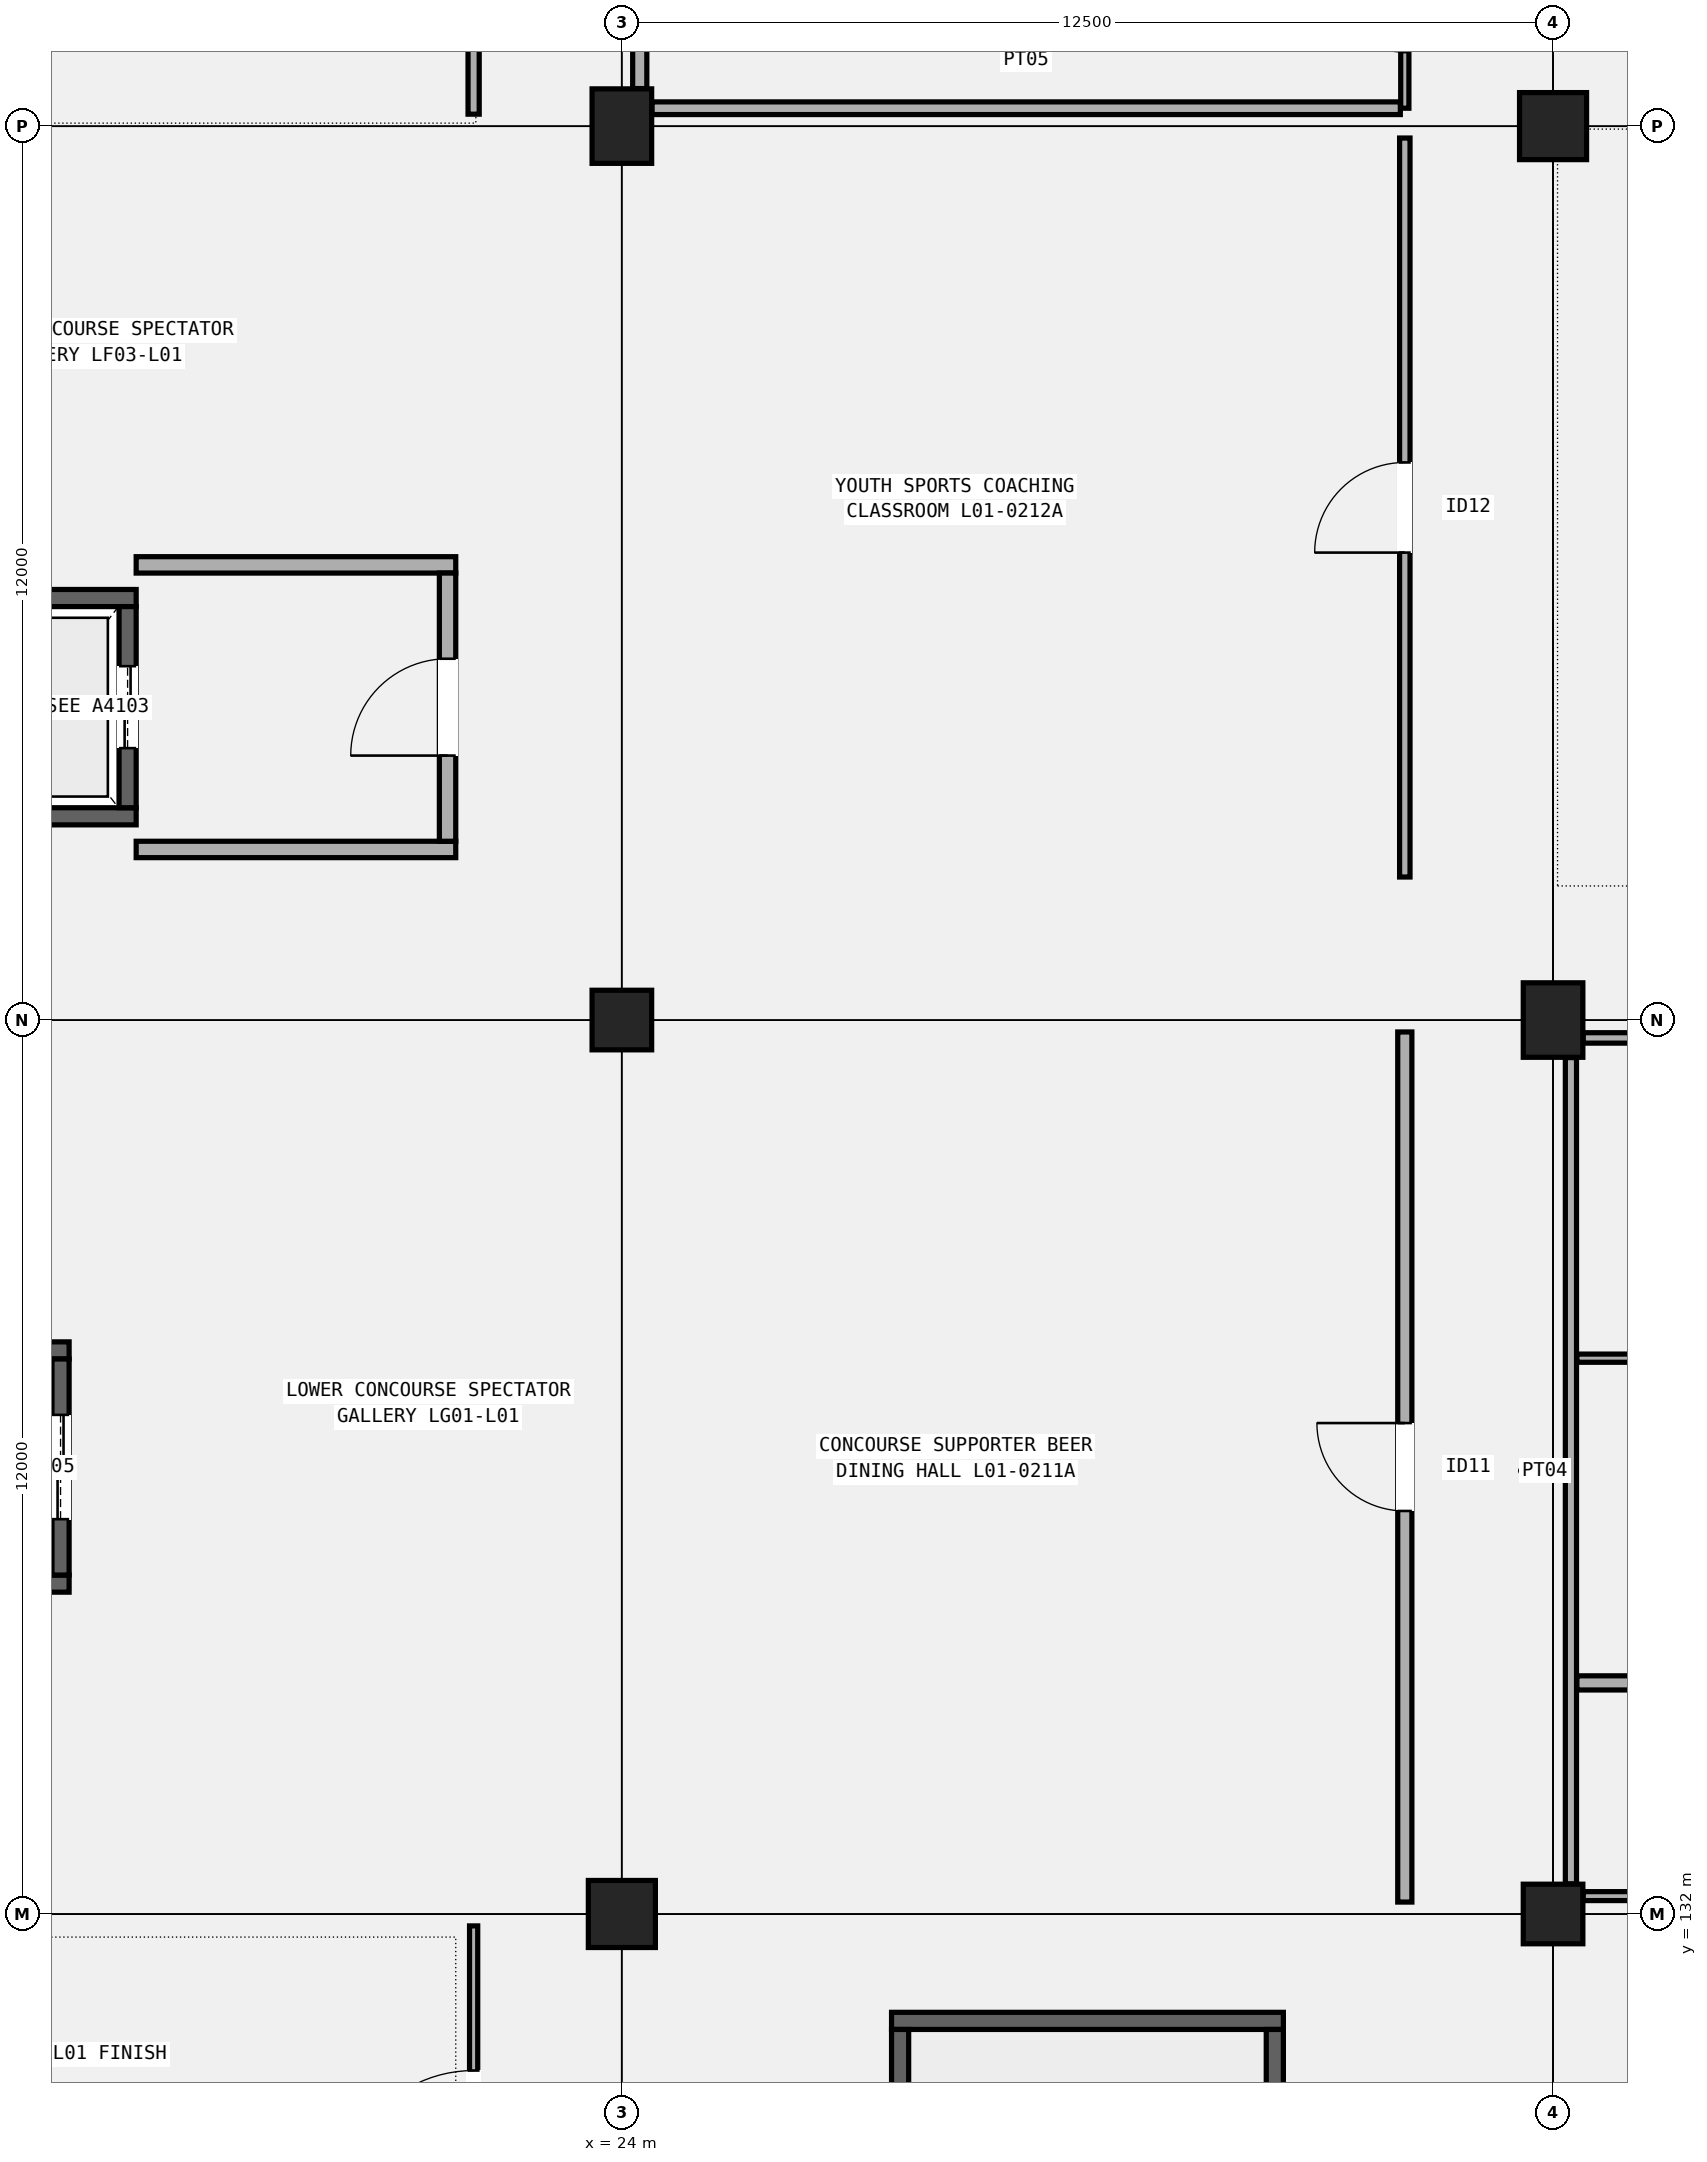
"""IFC4 building model, lengths in metres.
Left out: names, types, materials, properties, quantities, classifications, styles, units other than length and angle.
Written with IfcOpenShell. Run it as: python <this file> out.ifc"""

import sys

from ifc_helpers import new_model, si_unit, direction, frame, frame_2d, origin, origin_2d, place, context, subcontext, project, spatial, rectangle, extrude, element, fill, save


model = new_model("IFC4")
c1 = context("Model", 3, precision=1e-05, world=origin(), true_north=direction((0.0, 1.0)))
c2 = subcontext(c1, "Body", "Model", "MODEL_VIEW")
j1 = project(units=[si_unit("LENGTHUNIT", "METRE"), si_unit("PLANEANGLEUNIT", "RADIAN")], contexts=[c1])
p1 = place(None, origin())
s1 = spatial("IfcSite", under=j1, at=p1, CompositionType="ELEMENT")
p2 = place(p1, origin())
s2 = spatial("IfcBuilding", under=s1, at=p2, CompositionType="ELEMENT")
p3 = place(p2, frame((0.0, 0.0, 5.4)))
s3 = spatial("IfcBuildingStorey", under=s2, at=p3, CompositionType="ELEMENT", Elevation=5.4)
p4 = place(p3, frame((24.0, 132.0, 0.0), z_axis=(0.0, 0.0, 1.0), x_axis=(1.0, 0.0, 0.0)))
e1 = element("IfcColumn", 1, at=p4, inside=s3, PredefinedType="COLUMN", context=c2, shape_type="SweptSolid", body=[
    extrude(rectangle(XDim=0.9, YDim=0.9, at=origin_2d()), origin(), (0.0, 0.0, 1.0), 4.8),
])
p5 = place(p3, frame((24.0, 144.0, 0.0), z_axis=(0.0, 0.0, 1.0), x_axis=(1.0, 0.0, 0.0)))
e2 = element("IfcColumn", 2, at=p5, inside=s3, PredefinedType="COLUMN", context=c2, shape_type="SweptSolid", body=[
    extrude(rectangle(XDim=0.8, YDim=0.8, at=origin_2d()), origin(), (0.0, 0.0, 1.0), 4.8),
])
p6 = place(p3, frame((24.0, 156.0, 0.0), z_axis=(0.0, 0.0, 1.0), x_axis=(1.0, 0.0, 0.0)))
e3 = element("IfcColumn", 3, at=p6, inside=s3, PredefinedType="COLUMN", context=c2, shape_type="SweptSolid", body=[
    extrude(rectangle(XDim=0.8, YDim=1.0, at=origin_2d()), origin(), (0.0, 0.0, 1.0), 4.8),
])
p7 = place(p3, frame((36.5, 132.0, 0.0), z_axis=(0.0, 0.0, 1.0), x_axis=(1.0, 0.0, 0.0)))
e4 = element("IfcColumn", 4, at=p7, inside=s3, PredefinedType="COLUMN", context=c2, shape_type="SweptSolid", body=[
    extrude(rectangle(XDim=0.8, YDim=0.8, at=origin_2d()), origin(), (0.0, 0.0, 1.0), 4.8),
])
p8 = place(p3, frame((36.5, 144.0, 0.0), z_axis=(0.0, 0.0, 1.0), x_axis=(1.0, 0.0, 0.0)))
e5 = element("IfcColumn", 5, at=p8, inside=s3, PredefinedType="COLUMN", context=c2, shape_type="SweptSolid", body=[
    extrude(rectangle(XDim=0.8, YDim=1.0, at=origin_2d()), origin(), (0.0, 0.0, 1.0), 4.8),
])
p9 = place(p3, frame((36.5, 156.0, 0.0), z_axis=(0.0, 0.0, 1.0), x_axis=(1.0, 0.0, 0.0)))
e6 = element("IfcColumn", 6, at=p9, inside=s3, PredefinedType="COLUMN", context=c2, shape_type="SweptSolid", body=[
    extrude(rectangle(XDim=0.9, YDim=0.9, at=origin_2d()), origin(), (0.0, 0.0, 1.0), 4.8),
])
p10 = place(p3, frame((27.62, 130.565, 0.0), z_axis=(0.0, 0.0, 1.0), x_axis=(1.0, 0.0, 0.0)))
e7 = element("IfcWall", 7, at=p10, inside=s3, PredefinedType="SHEAR", context=c2, shape_type="SweptSolid", body=[
    extrude(rectangle(XDim=5.26, YDim=0.23, at=frame_2d((2.63, 0.0))), origin(), (0.0, 0.0, 1.0), 4.55),
])
for number, where, z_axis, x_axis in (
    (8, (27.735, 121.55, 0.0), (0.0, 0.0, 1.0), (0.0, 1.0, 0.0)),
    (9, (32.765, 121.55, 0.0), (0.0, 0.0, 1.0), (0.0, 1.0, 0.0)),
):
    element("IfcWall", number, at=place(p3, frame(where, z_axis=z_axis, x_axis=x_axis)), inside=s3, PredefinedType="SHEAR", context=c2, shape_type="SweptSolid", body=[
        extrude(rectangle(XDim=8.9, YDim=0.23, at=frame_2d((4.45, 0.0))), origin(), (0.0, 0.0, 1.0), 4.55),
    ])
for number, where, z_axis, x_axis in (
    (10, (14.92, 146.735, 0.0), (0.0, 0.0, 1.0), (1.0, 0.0, 0.0)),
    (11, (14.92, 149.665, 0.0), (0.0, 0.0, 1.0), (1.0, 0.0, 0.0)),
):
    element("IfcWall", number, at=place(p3, frame(where, z_axis=z_axis, x_axis=x_axis)), inside=s3, PredefinedType="SHEAR", context=c2, shape_type="SweptSolid", body=[
        extrude(rectangle(XDim=2.56, YDim=0.23, at=frame_2d((1.28, 0.0))), origin(), (0.0, 0.0, 1.0), 4.55),
    ])
p11 = place(p3, frame((17.365, 146.85, 0.0), z_axis=(0.0, 0.0, 1.0), x_axis=(0.0, 1.0, 0.0)))
e12 = element("IfcWall", 12, at=p11, inside=s3, PredefinedType="SHEAR", context=c2, shape_type="SweptSolid", body=[
    extrude(rectangle(XDim=2.7, YDim=0.23, at=frame_2d((1.35, 0.0))), origin(), (0.0, 0.0, 1.0), 4.55),
])
p12 = place(p11, frame((0.8, 0.0, 0.0)))
e13 = element("IfcOpeningElement", 13, at=p12, cuts=e12, PredefinedType="OPENING", context=c2, shape_type="SweptSolid", body=[
    extrude(rectangle(XDim=1.1, YDim=2.15, at=frame_2d((0.55, 1.075))), frame((0.0, 0.125, 0.0), z_axis=(0.0, -1.0, 0.0), x_axis=(1.0, 0.0, 0.0)), (0.0, 0.0, 1.0), 0.25),
])
for number, where, z_axis, x_axis in (
    (14, (17.48, 146.29, 0.0), (0.0, 0.0, 1.0), (1.0, 0.0, 0.0)),
    (15, (17.48, 150.11, 0.0), (0.0, 0.0, 1.0), (1.0, 0.0, 0.0)),
):
    element("IfcWall", number, at=place(p3, frame(where, z_axis=z_axis, x_axis=x_axis)), inside=s3, PredefinedType="SOLIDWALL", context=c2, shape_type="SweptSolid", body=[
        extrude(rectangle(XDim=4.29, YDim=0.22, at=frame_2d((2.145, 0.0))), origin(), (0.0, 0.0, 1.0), 3.92),
    ])
p13 = place(p3, frame((21.66, 146.4, 0.0), z_axis=(0.0, 0.0, 1.0), x_axis=(0.0, 1.0, 0.0)))
e16 = element("IfcWall", 16, at=p13, inside=s3, PredefinedType="SOLIDWALL", context=c2, shape_type="SweptSolid", body=[
    extrude(rectangle(XDim=3.6, YDim=0.22, at=frame_2d((1.8, 0.0))), origin(), (0.0, 0.0, 1.0), 3.92),
])
p14 = place(p13, frame((1.15, 0.0, 0.0)))
e17 = element("IfcOpeningElement", 17, at=p14, cuts=e16, PredefinedType="OPENING", context=c2, shape_type="SweptSolid", body=[
    extrude(rectangle(XDim=1.3, YDim=2.15, at=frame_2d((0.65, 1.075))), frame((0.0, 0.12, 0.0), z_axis=(0.0, -1.0, 0.0), x_axis=(1.0, 0.0, 0.0)), (0.0, 0.0, 1.0), 0.24),
])
for number, where, z_axis, x_axis in (
    (18, (13.82, 136.435, 0.0), (0.0, 0.0, 1.0), (1.0, 0.0, 0.0)),
    (19, (13.82, 139.565, 0.0), (0.0, 0.0, 1.0), (1.0, 0.0, 0.0)),
):
    element("IfcWall", number, at=place(p3, frame(where, z_axis=z_axis, x_axis=x_axis)), inside=s3, PredefinedType="SHEAR", context=c2, shape_type="SweptSolid", body=[
        extrude(rectangle(XDim=2.76, YDim=0.23, at=frame_2d((1.38, 0.0))), origin(), (0.0, 0.0, 1.0), 4.55),
    ])
p15 = place(p3, frame((16.465, 136.55, 0.0), z_axis=(0.0, 0.0, 1.0), x_axis=(0.0, 1.0, 0.0)))
e20 = element("IfcWall", 20, at=p15, inside=s3, PredefinedType="SHEAR", context=c2, shape_type="SweptSolid", body=[
    extrude(rectangle(XDim=2.9, YDim=0.23, at=frame_2d((1.45, 0.0))), origin(), (0.0, 0.0, 1.0), 4.55),
])
p16 = place(p15, frame((0.75, 0.0, 0.0)))
e21 = element("IfcOpeningElement", 21, at=p16, cuts=e20, PredefinedType="OPENING", context=c2, shape_type="SweptSolid", body=[
    extrude(rectangle(XDim=1.4, YDim=2.25, at=frame_2d((0.7, 1.125))), frame((0.0, 0.125, 0.0), z_axis=(0.0, -1.0, 0.0), x_axis=(1.0, 0.0, 0.0)), (0.0, 0.0, 1.0), 0.25),
])
p17 = place(p3, frame((22.01, 120.16, 0.0), z_axis=(0.0, 0.0, 1.0), x_axis=(0.0, 1.0, 0.0)))
e22 = element("IfcWall", 22, at=p17, inside=s3, PredefinedType="PARTITIONING", context=c2, shape_type="SweptSolid", body=[
    extrude(rectangle(XDim=11.68, YDim=0.11, at=frame_2d((5.84, 0.0))), origin(), (0.0, 0.0, 1.0), 3.92),
])
p18 = place(p17, frame((2.088, 0.0, 0.0)))
e23 = element("IfcOpeningElement", 23, at=p18, cuts=e22, PredefinedType="OPENING", context=c2, shape_type="SweptSolid", body=[
    extrude(rectangle(XDim=1.7, YDim=2.32, at=frame_2d((0.85, 1.16))), frame((0.0, 0.065, 0.0), z_axis=(0.0, -1.0, 0.0), x_axis=(1.0, 0.0, 0.0)), (0.0, 0.0, 1.0), 0.13),
])
p19 = place(p17, frame((7.979, 0.0, 0.0)))
e24 = element("IfcOpeningElement", 24, at=p19, cuts=e22, PredefinedType="OPENING", context=c2, shape_type="SweptSolid", body=[
    extrude(rectangle(XDim=1.76, YDim=2.3, at=frame_2d((0.88, 1.15))), frame((0.0, 0.065, 0.0), z_axis=(0.0, -1.0, 0.0), x_axis=(1.0, 0.0, 0.0)), (0.0, 0.0, 1.0), 0.13),
])
p20 = place(p3, frame((22.01, 156.16, 0.0), z_axis=(0.0, 0.0, 1.0), x_axis=(0.0, 1.0, 0.0)))
e25 = element("IfcWall", 25, at=p20, inside=s3, PredefinedType="PARTITIONING", context=c2, shape_type="SweptSolid", body=[
    extrude(rectangle(XDim=11.668, YDim=0.15, at=frame_2d((5.834, 0.0))), origin(), (0.0, 0.0, 1.0), 3.92),
])
p21 = place(p20, frame((5.39, 0.0, 0.0)))
e26 = element("IfcOpeningElement", 26, at=p21, cuts=e25, PredefinedType="OPENING", context=c2, shape_type="SweptSolid", body=[
    extrude(rectangle(XDim=0.9, YDim=2.06, at=frame_2d((0.45, 1.03))), frame((0.0, 0.085, 0.0), z_axis=(0.0, -1.0, 0.0), x_axis=(1.0, 0.0, 0.0)), (0.0, 0.0, 1.0), 0.17),
])
p22 = place(p3, frame((34.51, 132.16, 0.0), z_axis=(0.0, 0.0, 1.0), x_axis=(0.0, 1.0, 0.0)))
e27 = element("IfcWall", 27, at=p22, inside=s3, PredefinedType="PARTITIONING", context=c2, shape_type="SweptSolid", body=[
    extrude(rectangle(XDim=11.68, YDim=0.19, at=frame_2d((5.84, 0.0))), origin(), (0.0, 0.0, 1.0), 3.92),
])
p23 = place(p22, frame((5.25, 0.0, 0.0)))
e28 = element("IfcOpeningElement", 28, at=p23, cuts=e27, PredefinedType="OPENING", context=c2, shape_type="SweptSolid", body=[
    extrude(rectangle(XDim=1.18, YDim=2.2, at=frame_2d((0.59, 1.1))), frame((0.0, 0.105, 0.0), z_axis=(0.0, -1.0, 0.0), x_axis=(1.0, 0.0, 0.0)), (0.0, 0.0, 1.0), 0.21),
])
p24 = place(p3, frame((34.51, 145.92, 0.0), z_axis=(0.0, 0.0, 1.0), x_axis=(0.0, 1.0, 0.0)))
e29 = element("IfcWall", 29, at=p24, inside=s3, PredefinedType="PARTITIONING", context=c2, shape_type="SweptSolid", body=[
    extrude(rectangle(XDim=9.92, YDim=0.14, at=frame_2d((4.96, 0.0))), origin(), (0.0, 0.0, 1.0), 3.92),
])
p25 = place(p24, frame((4.355, 0.0, 0.0)))
e30 = element("IfcOpeningElement", 30, at=p25, cuts=e29, PredefinedType="OPENING", context=c2, shape_type="SweptSolid", body=[
    extrude(rectangle(XDim=1.21, YDim=2.18, at=frame_2d((0.605, 1.09))), frame((0.0, 0.08, 0.0), z_axis=(0.0, -1.0, 0.0), x_axis=(1.0, 0.0, 0.0)), (0.0, 0.0, 1.0), 0.16),
])
p26 = place(p3, frame((34.51, 156.24, 0.0), z_axis=(0.0, 0.0, 1.0), x_axis=(0.0, 1.0, 0.0)))
e31 = element("IfcWall", 31, at=p26, inside=s3, PredefinedType="PARTITIONING", context=c2, shape_type="SweptSolid", body=[
    extrude(rectangle(XDim=11.553, YDim=0.11, at=frame_2d((5.776, 0.0))), origin(), (0.0, 0.0, 1.0), 3.92),
])
p27 = place(p26, frame((0.753, 0.0, 0.0)))
e32 = element("IfcOpeningElement", 32, at=p27, cuts=e31, PredefinedType="OPENING", context=c2, shape_type="SweptSolid", body=[
    extrude(rectangle(XDim=1.24, YDim=2.22, at=frame_2d((0.62, 1.11))), frame((0.0, 0.065, 0.0), z_axis=(0.0, -1.0, 0.0), x_axis=(1.0, 0.0, 0.0)), (0.0, 0.0, 1.0), 0.13),
])
p28 = place(p26, frame((4.305, 0.0, 0.0)))
e33 = element("IfcOpeningElement", 33, at=p28, cuts=e31, PredefinedType="OPENING", context=c2, shape_type="SweptSolid", body=[
    extrude(rectangle(XDim=1.27, YDim=2.2, at=frame_2d((0.635, 1.1))), frame((0.0, 0.065, 0.0), z_axis=(0.0, -1.0, 0.0), x_axis=(1.0, 0.0, 0.0)), (0.0, 0.0, 1.0), 0.13),
])
p29 = place(p26, frame((8.677, 0.0, 0.0)))
e34 = element("IfcOpeningElement", 34, at=p29, cuts=e31, PredefinedType="OPENING", context=c2, shape_type="SweptSolid", body=[
    extrude(rectangle(XDim=1.3, YDim=2.24, at=frame_2d((0.65, 1.12))), frame((0.0, 0.065, 0.0), z_axis=(0.0, -1.0, 0.0), x_axis=(1.0, 0.0, 0.0)), (0.0, 0.0, 1.0), 0.13),
])
p30 = place(p3, frame((24.404, 156.24, 0.0), z_axis=(0.0, 0.0, 1.0), x_axis=(1.0, 0.0, 0.0)))
e35 = element("IfcWall", 35, at=p30, inside=s3, PredefinedType="PARTITIONING", context=c2, shape_type="SweptSolid", body=[
    extrude(rectangle(XDim=10.046, YDim=0.17, at=frame_2d((5.023, 0.0))), origin(), (0.0, 0.0, 1.0), 3.71),
])
p31 = place(p3, frame((24.24, 156.504, 0.0), z_axis=(0.0, 0.0, 1.0), x_axis=(0.0, 1.0, 0.0)))
e36 = element("IfcWall", 36, at=p31, inside=s3, PredefinedType="PARTITIONING", context=c2, shape_type="SweptSolid", body=[
    extrude(rectangle(XDim=11.042, YDim=0.19, at=frame_2d((5.521, 0.0))), origin(), (0.0, 0.0, 1.0), 3.71),
])
p32 = place(p3, frame((36.904, 132.24, 0.0), z_axis=(0.0, 0.0, 1.0), x_axis=(1.0, 0.0, 0.0)))
e37 = element("IfcWall", 37, at=p32, inside=s3, PredefinedType="PARTITIONING", context=c2, shape_type="SweptSolid", body=[
    extrude(rectangle(XDim=10.016, YDim=0.12, at=frame_2d((5.008, 0.0))), origin(), (0.0, 0.0, 1.0), 3.92),
])
p33 = place(p3, frame((36.904, 143.76, 0.0), z_axis=(0.0, 0.0, 1.0), x_axis=(1.0, 0.0, 0.0)))
e38 = element("IfcWall", 38, at=p33, inside=s3, PredefinedType="PARTITIONING", context=c2, shape_type="SweptSolid", body=[
    extrude(rectangle(XDim=10.016, YDim=0.14, at=frame_2d((5.008, 0.0))), origin(), (0.0, 0.0, 1.0), 3.71),
])
p34 = place(p3, frame((36.74, 132.404, 0.0), z_axis=(0.0, 0.0, 1.0), x_axis=(0.0, 1.0, 0.0)))
e39 = element("IfcWall", 39, at=p34, inside=s3, PredefinedType="PARTITIONING", context=c2, shape_type="SweptSolid", body=[
    extrude(rectangle(XDim=11.092, YDim=0.15, at=frame_2d((5.546, 0.0))), origin(), (0.0, 0.0, 1.0), 3.92),
])
p35 = place(p3, frame((36.82, 135.102, 0.0), z_axis=(0.0, 0.0, 1.0), x_axis=(1.0, 0.0, 0.0)))
e40 = element("IfcWall", 40, at=p35, inside=s3, PredefinedType="PARTITIONING", context=c2, shape_type="SweptSolid", body=[
    extrude(rectangle(XDim=10.1, YDim=0.19, at=frame_2d((5.05, 0.0))), origin(), (0.0, 0.0, 1.0), 3.92),
])
p36 = place(p3, frame((36.82, 139.461, 0.0), z_axis=(0.0, 0.0, 1.0), x_axis=(1.0, 0.0, 0.0)))
e41 = element("IfcWall", 41, at=p36, inside=s3, PredefinedType="PARTITIONING", context=c2, shape_type="SweptSolid", body=[
    extrude(rectangle(XDim=10.1, YDim=0.11, at=frame_2d((5.05, 0.0))), origin(), (0.0, 0.0, 1.0), 3.92),
])
p37 = place(p12, origin())
e42 = element("IfcDoor", 42, at=p37, inside=s3, OperationType="DOUBLE_DOOR_SLIDING", PredefinedType="DOOR", context=c2, shape_type="SweptSolid", body=[
    extrude(rectangle(XDim=1.1, YDim=2.15, at=frame_2d((0.55, 1.075))), frame((0.0, 0.025, 0.0), z_axis=(0.0, -1.0, 0.0), x_axis=(1.0, 0.0, 0.0)), (0.0, 0.0, 1.0), 0.05),
])
fill(e13, e42)
p38 = place(p14, origin())
e43 = element("IfcDoor", 43, at=p38, inside=s3, OperationType="SINGLE_SWING_LEFT", PredefinedType="DOOR", context=c2, shape_type="SweptSolid", body=[
    extrude(rectangle(XDim=1.3, YDim=2.15, at=frame_2d((0.65, 1.075))), frame((0.0, 0.025, 0.0), z_axis=(0.0, -1.0, 0.0), x_axis=(1.0, 0.0, 0.0)), (0.0, 0.0, 1.0), 0.05),
])
fill(e17, e43)
p39 = place(p16, origin())
e44 = element("IfcDoor", 44, at=p39, inside=s3, OperationType="DOUBLE_DOOR_SLIDING", PredefinedType="DOOR", context=c2, shape_type="SweptSolid", body=[
    extrude(rectangle(XDim=1.4, YDim=2.25, at=frame_2d((0.7, 1.125))), frame((0.0, 0.025, 0.0), z_axis=(0.0, -1.0, 0.0), x_axis=(1.0, 0.0, 0.0)), (0.0, 0.0, 1.0), 0.05),
])
fill(e21, e44)
p40 = place(p19, origin())
e45 = element("IfcDoor", 45, at=p40, inside=s3, OperationType="SINGLE_SWING_LEFT", PredefinedType="DOOR", context=c2, shape_type="SweptSolid", body=[
    extrude(rectangle(XDim=1.76, YDim=2.3, at=frame_2d((0.88, 1.15))), frame((0.0, 0.025, 0.0), z_axis=(0.0, -1.0, 0.0), x_axis=(1.0, 0.0, 0.0)), (0.0, 0.0, 1.0), 0.05),
])
fill(e24, e45)
p41 = place(p23, origin())
e46 = element("IfcDoor", 46, at=p41, inside=s3, OperationType="SINGLE_SWING_RIGHT", PredefinedType="DOOR", context=c2, shape_type="SweptSolid", body=[
    extrude(rectangle(XDim=1.18, YDim=2.2, at=frame_2d((0.59, 1.1))), frame((0.0, 0.025, 0.0), z_axis=(0.0, -1.0, 0.0), x_axis=(1.0, 0.0, 0.0)), (0.0, 0.0, 1.0), 0.05),
])
fill(e28, e46)
p42 = place(p25, origin())
e47 = element("IfcDoor", 47, at=p42, inside=s3, OperationType="SINGLE_SWING_LEFT", PredefinedType="DOOR", context=c2, shape_type="SweptSolid", body=[
    extrude(rectangle(XDim=1.21, YDim=2.18, at=frame_2d((0.605, 1.09))), frame((0.0, 0.025, 0.0), z_axis=(0.0, -1.0, 0.0), x_axis=(1.0, 0.0, 0.0)), (0.0, 0.0, 1.0), 0.05),
])
fill(e30, e47)
p43 = place(p27, origin())
e48 = element("IfcDoor", 48, at=p43, inside=s3, OperationType="SINGLE_SWING_RIGHT", PredefinedType="DOOR", context=c2, shape_type="SweptSolid", body=[
    extrude(rectangle(XDim=1.24, YDim=2.22, at=frame_2d((0.62, 1.11))), frame((0.0, 0.025, 0.0), z_axis=(0.0, -1.0, 0.0), x_axis=(1.0, 0.0, 0.0)), (0.0, 0.0, 1.0), 0.05),
])
fill(e32, e48)
save(model, sys.argv[1])
